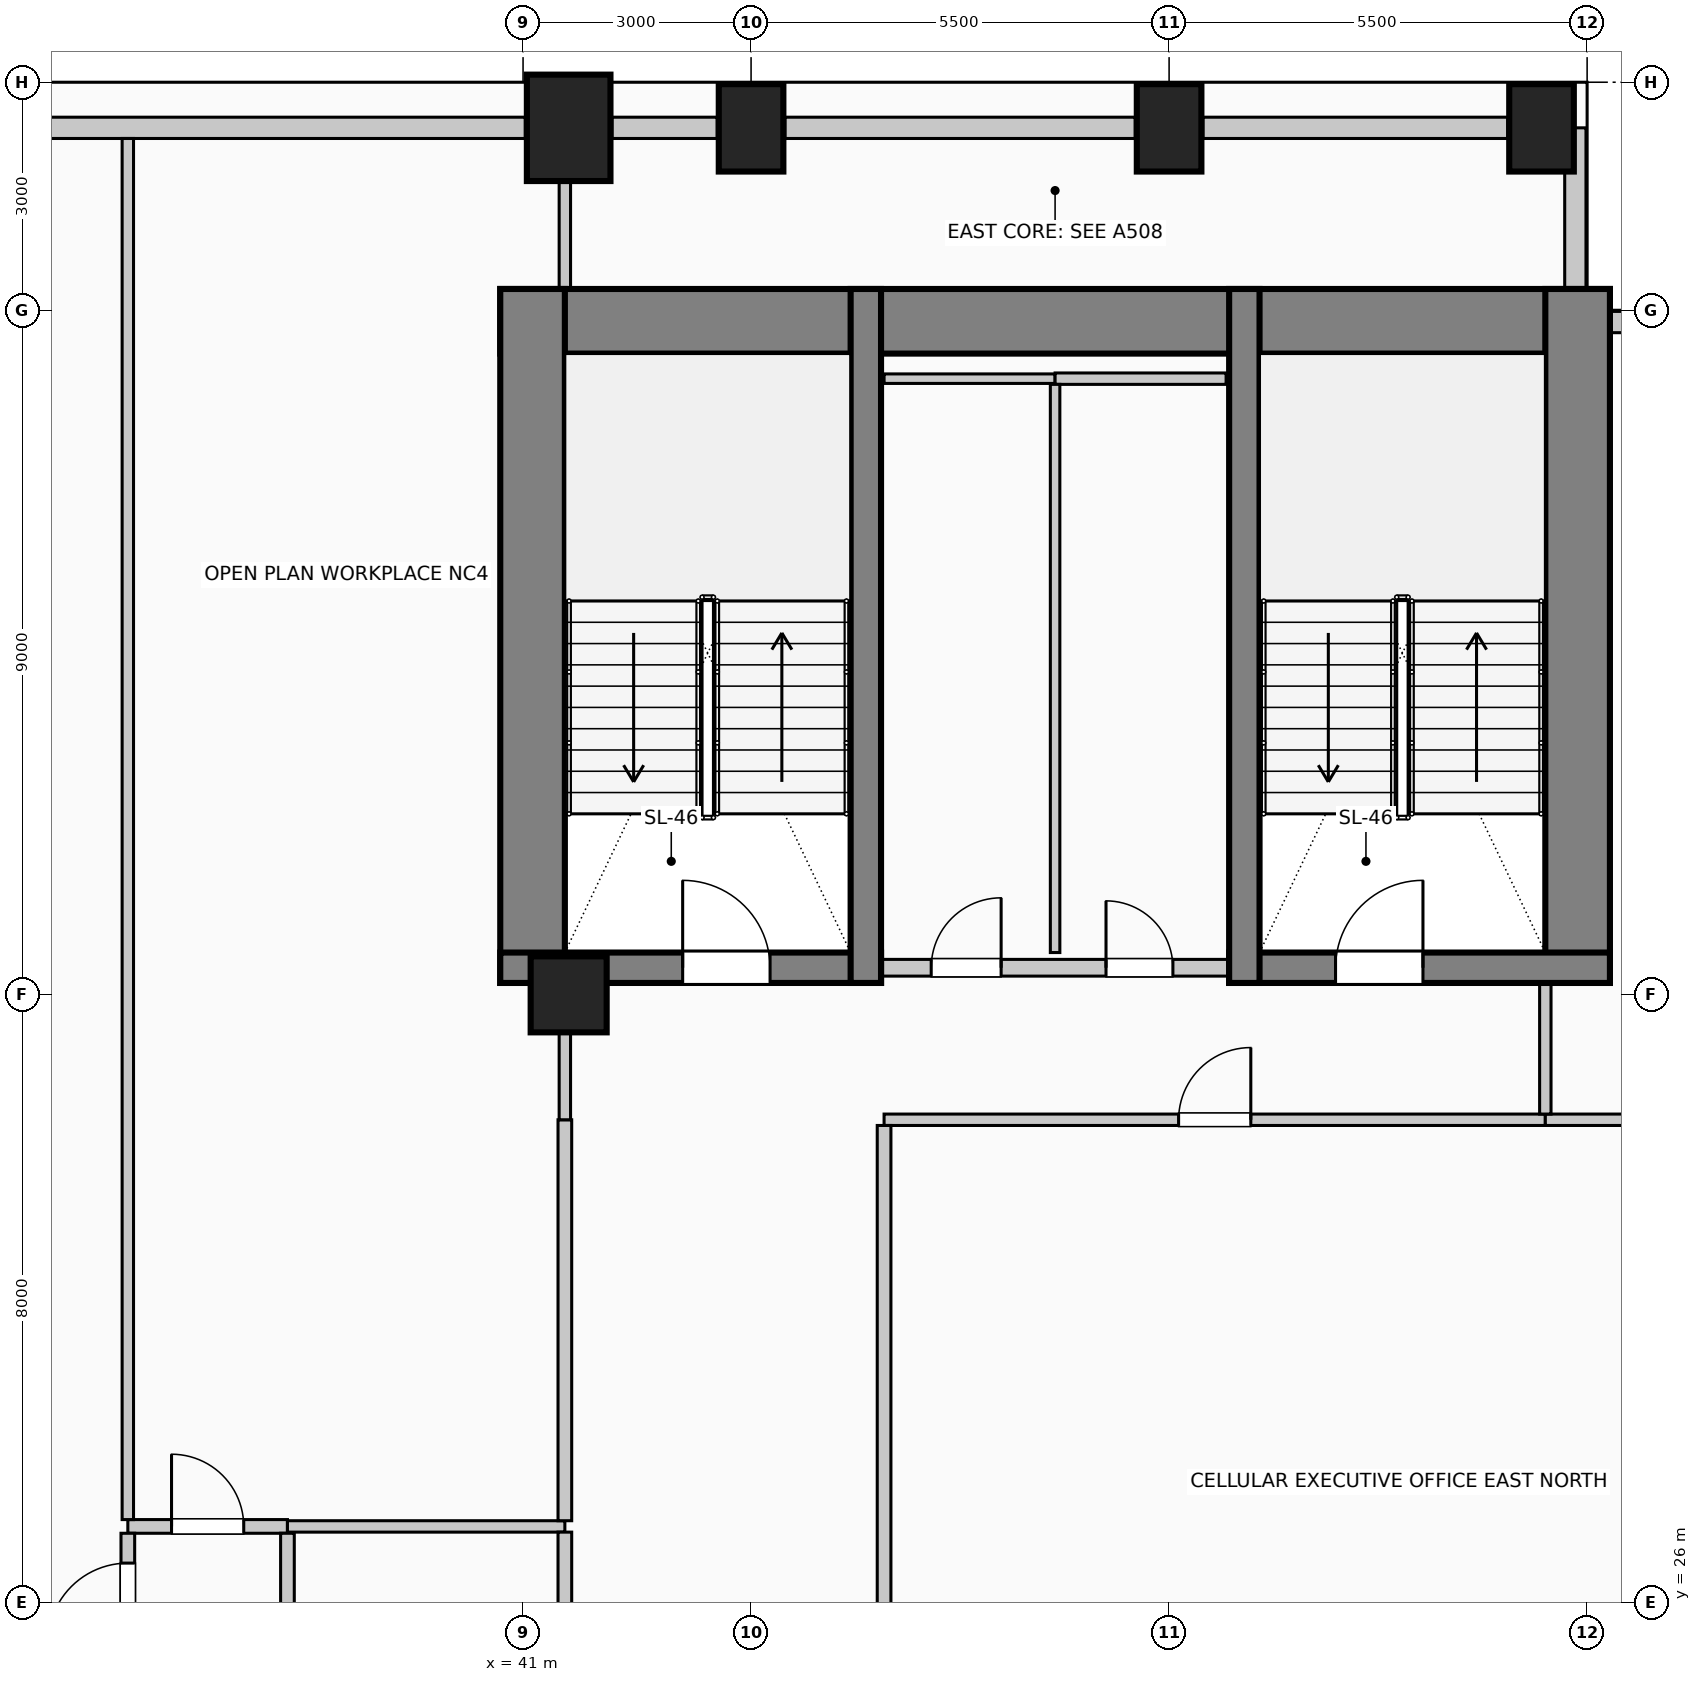
"""IFC4 building model, lengths in metres.
Left out: names, types, materials, properties, quantities, classifications, styles, units other than length and angle.
Written with IfcOpenShell. Run it as: python <this file> out.ifc"""

import sys

from ifc_helpers import new_model, si_unit, direction, frame, frame_2d, origin, origin_2d, place, context, subcontext, project, spatial, rectangle, circle, extrude, element, fill, save


model = new_model("IFC4")
c1 = context("Model", 3, precision=1e-05, world=origin(), true_north=direction((0.0, 1.0)))
c2 = subcontext(c1, "Body", "Model", "MODEL_VIEW")
j1 = project(units=[si_unit("LENGTHUNIT", "METRE"), si_unit("PLANEANGLEUNIT", "RADIAN")], contexts=[c1])
p1 = place(None, origin())
s1 = spatial("IfcSite", under=j1, at=p1, CompositionType="ELEMENT")
p2 = place(p1, origin())
s2 = spatial("IfcBuilding", under=s1, at=p2, CompositionType="ELEMENT")
p3 = place(p2, frame((0.0, 0.0, 144.6)))
s3 = spatial("IfcBuildingStorey", under=s2, at=p3, CompositionType="ELEMENT", Elevation=144.6)
p4 = place(p3, frame((40.7, 42.855, 0.0), z_axis=(0.0, 0.0, 1.0), x_axis=(1.0, 0.0, 0.0)))
e1 = element("IfcWall", 1, at=p4, inside=s3, PredefinedType="SHEAR", context=c2, shape_type="SweptSolid", body=[
    extrude(rectangle(XDim=14.6, YDim=0.85, at=frame_2d((7.3, 0.0))), origin(), (0.0, 0.0, 1.0), 4.0),
])
for number, where, z_axis, x_axis in (
    (2, (41.125, 34.15, 0.0), (0.0, 0.0, 1.0), (0.0, 1.0, 0.0)),
    (3, (54.875, 34.15, 0.0), (0.0, 0.0, 1.0), (0.0, 1.0, 0.0)),
):
    element("IfcWall", number, at=place(p3, frame(where, z_axis=z_axis, x_axis=x_axis)), inside=s3, PredefinedType="SHEAR", context=c2, shape_type="SweptSolid", body=[
        extrude(rectangle(XDim=9.13, YDim=0.85, at=frame_2d((4.565, 0.0))), origin(), (0.0, 0.0, 1.0), 4.0),
    ])
p5 = place(p3, frame((40.7, 34.35, 0.0), z_axis=(0.0, 0.0, 1.0), x_axis=(1.0, 0.0, 0.0)))
e4 = element("IfcWall", 4, at=p5, inside=s3, PredefinedType="SHEAR", context=c2, shape_type="SweptSolid", body=[
    extrude(rectangle(XDim=5.01, YDim=0.4, at=frame_2d((2.505, 0.0))), origin(), (0.0, 0.0, 1.0), 4.0),
])
p6 = place(p5, frame((2.4, 0.0, 0.0)))
e5 = element("IfcOpeningElement", 5, at=p6, cuts=e4, PredefinedType="OPENING", context=c2, shape_type="SweptSolid", body=[
    extrude(rectangle(XDim=1.15, YDim=2.2, at=frame_2d((0.575, 1.1))), frame((0.0, 0.21, 0.0), z_axis=(0.0, -1.0, 0.0), x_axis=(1.0, 0.0, 0.0)), (0.0, 0.0, 1.0), 0.42),
])
p7 = place(p3, frame((45.51, 34.15, 0.0), z_axis=(0.0, 0.0, 1.0), x_axis=(0.0, 1.0, 0.0)))
e6 = element("IfcWall", 6, at=p7, inside=s3, PredefinedType="SHEAR", context=c2, shape_type="SweptSolid", body=[
    extrude(rectangle(XDim=9.13, YDim=0.4, at=frame_2d((4.565, 0.0))), origin(), (0.0, 0.0, 1.0), 4.0),
])
p8 = place(p3, frame((50.29, 34.35, 0.0), z_axis=(0.0, 0.0, 1.0), x_axis=(1.0, 0.0, 0.0)))
e7 = element("IfcWall", 7, at=p8, inside=s3, PredefinedType="SHEAR", context=c2, shape_type="SweptSolid", body=[
    extrude(rectangle(XDim=5.01, YDim=0.4, at=frame_2d((2.505, 0.0))), origin(), (0.0, 0.0, 1.0), 4.0),
])
p9 = place(p8, frame((1.4, 0.0, 0.0)))
e8 = element("IfcOpeningElement", 8, at=p9, cuts=e7, PredefinedType="OPENING", context=c2, shape_type="SweptSolid", body=[
    extrude(rectangle(XDim=1.15, YDim=2.2, at=frame_2d((0.575, 1.1))), frame((0.0, 0.21, 0.0), z_axis=(0.0, -1.0, 0.0), x_axis=(1.0, 0.0, 0.0)), (0.0, 0.0, 1.0), 0.42),
])
p10 = place(p3, frame((50.49, 34.15, 0.0), z_axis=(0.0, 0.0, 1.0), x_axis=(0.0, 1.0, 0.0)))
e9 = element("IfcWall", 9, at=p10, inside=s3, PredefinedType="SHEAR", context=c2, shape_type="SweptSolid", body=[
    extrude(rectangle(XDim=9.13, YDim=0.4, at=frame_2d((4.565, 0.0))), origin(), (0.0, 0.0, 1.0), 4.0),
])
p11 = place(p3, frame((41.6, 45.4, 0.0), z_axis=(0.0, 0.0, 1.0), x_axis=(1.0, 0.0, 0.0)))
e10 = element("IfcColumn", 10, at=p11, inside=s3, PredefinedType="COLUMN", context=c2, shape_type="SweptSolid", body=[
    extrude(rectangle(XDim=1.1, YDim=1.4, at=origin_2d()), origin(), (0.0, 0.0, 1.0), 4.0),
])
for number, where, z_axis, x_axis in (
    (11, (44.0, 45.4, 0.0), (0.0, 0.0, 1.0), (1.0, 0.0, 0.0)),
    (12, (49.5, 45.4, 0.0), (0.0, 0.0, 1.0), (1.0, 0.0, 0.0)),
    (13, (54.4, 45.4, 0.0), (0.0, 0.0, 1.0), (1.0, 0.0, 0.0)),
):
    element("IfcColumn", number, at=place(p3, frame(where, z_axis=z_axis, x_axis=x_axis)), inside=s3, PredefinedType="COLUMN", context=c2, shape_type="SweptSolid", body=[
        extrude(rectangle(XDim=0.85, YDim=1.15, at=origin_2d()), origin(), (0.0, 0.0, 1.0), 4.0),
    ])
p12 = place(p3, frame((41.6, 34.0, 0.0), z_axis=(0.0, 0.0, 1.0), x_axis=(1.0, 0.0, 0.0)))
e14 = element("IfcColumn", 14, at=p12, inside=s3, PredefinedType="COLUMN", context=c2, shape_type="SweptSolid", body=[
    extrude(circle(Radius=0.5, at=origin_2d()), origin(), (0.0, 0.0, 1.0), 4.0),
])
p13 = place(p3, frame((34.57, 45.4, 0.0), z_axis=(0.0, 0.0, 1.0), x_axis=(1.0, 0.0, 0.0)))
e15 = element("IfcWall", 15, at=p13, inside=s3, PredefinedType="SOLIDWALL", context=c2, shape_type="SweptSolid", body=[
    extrude(rectangle(XDim=6.46, YDim=0.28, at=frame_2d((3.23, 0.0))), origin(), (0.0, 0.0, 1.0), 2.875),
])
p14 = place(p3, frame((42.17, 45.4, 0.0), z_axis=(0.0, 0.0, 1.0), x_axis=(1.0, 0.0, 0.0)))
e16 = element("IfcWall", 16, at=p14, inside=s3, PredefinedType="SOLIDWALL", context=c2, shape_type="SweptSolid", body=[
    extrude(rectangle(XDim=1.385, YDim=0.28, at=frame_2d((0.692, 0.0))), origin(), (0.0, 0.0, 1.0), 2.875),
])
p15 = place(p3, frame((44.445, 45.4, 0.0), z_axis=(0.0, 0.0, 1.0), x_axis=(1.0, 0.0, 0.0)))
e17 = element("IfcWall", 17, at=p15, inside=s3, PredefinedType="SOLIDWALL", context=c2, shape_type="SweptSolid", body=[
    extrude(rectangle(XDim=4.61, YDim=0.28, at=frame_2d((2.305, 0.0))), origin(), (0.0, 0.0, 1.0), 2.875),
])
p16 = place(p3, frame((49.945, 45.4, 0.0), z_axis=(0.0, 0.0, 1.0), x_axis=(1.0, 0.0, 0.0)))
e18 = element("IfcWall", 18, at=p16, inside=s3, PredefinedType="SOLIDWALL", context=c2, shape_type="SweptSolid", body=[
    extrude(rectangle(XDim=4.01, YDim=0.28, at=frame_2d((2.005, 0.0))), origin(), (0.0, 0.0, 1.0), 2.875),
])
p17 = place(p3, frame((54.845, 45.4, 0.0), z_axis=(0.0, 0.0, 1.0), x_axis=(0.0, -1.0, 0.0)))
e19 = element("IfcWall", 19, at=p17, inside=s3, PredefinedType="SOLIDWALL", context=c2, shape_type="SweptSolid", body=[
    extrude(rectangle(XDim=2.115, YDim=0.28, at=frame_2d((1.058, 0.0))), origin(), (0.0, 0.0, 1.0), 3.725),
])
p18 = place(p3, frame((55.305, 42.845, 0.0), z_axis=(0.0, 0.0, 1.0), x_axis=(1.0, 0.0, 0.0)))
e20 = element("IfcWall", 20, at=p18, inside=s3, PredefinedType="SOLIDWALL", context=c2, shape_type="SweptSolid", body=[
    extrude(rectangle(XDim=2.095, YDim=0.28, at=frame_2d((1.047, 0.0))), origin(), (0.0, 0.0, 1.0), 3.725),
])
p19 = place(p3, frame((45.72, 34.35, 0.0), z_axis=(0.0, 0.0, 1.0), x_axis=(1.0, 0.0, 0.0)))
e21 = element("IfcWall", 21, at=p19, inside=s3, PredefinedType="PARTITIONING", context=c2, shape_type="SweptSolid", body=[
    extrude(rectangle(XDim=4.56, YDim=0.22, at=frame_2d((2.28, 0.0))), origin(), (0.0, 0.0, 1.0), 3.725),
])
p20 = place(p19, frame((0.65, 0.0, 0.0)))
e22 = element("IfcOpeningElement", 22, at=p20, cuts=e21, PredefinedType="OPENING", context=c2, shape_type="SweptSolid", body=[
    extrude(rectangle(XDim=0.92, YDim=2.1, at=frame_2d((0.46, 1.05))), frame((0.0, 0.12, 0.0), z_axis=(0.0, -1.0, 0.0), x_axis=(1.0, 0.0, 0.0)), (0.0, 0.0, 1.0), 0.24),
])
p21 = place(p19, frame((2.95, 0.0, 0.0)))
e23 = element("IfcOpeningElement", 23, at=p21, cuts=e21, PredefinedType="OPENING", context=c2, shape_type="SweptSolid", body=[
    extrude(rectangle(XDim=0.88, YDim=2.1, at=frame_2d((0.44, 1.05))), frame((0.0, 0.12, 0.0), z_axis=(0.0, -1.0, 0.0), x_axis=(1.0, 0.0, 0.0)), (0.0, 0.0, 1.0), 0.24),
])
p22 = place(p3, frame((35.8, 27.0, 0.0), z_axis=(0.0, 0.0, 1.0), x_axis=(1.0, 0.0, 0.0)))
e24 = element("IfcWall", 24, at=p22, inside=s3, PredefinedType="PARTITIONING", context=c2, shape_type="SweptSolid", body=[
    extrude(rectangle(XDim=2.1, YDim=0.18, at=frame_2d((1.05, 0.0))), origin(), (0.0, 0.0, 1.0), 3.725),
])
p23 = place(p22, frame((0.575, 0.0, 0.0)))
e25 = element("IfcOpeningElement", 25, at=p23, cuts=e24, PredefinedType="OPENING", context=c2, shape_type="SweptSolid", body=[
    extrude(rectangle(XDim=0.95, YDim=2.15, at=frame_2d((0.475, 1.075))), frame((0.0, 0.1, 0.0), z_axis=(0.0, -1.0, 0.0), x_axis=(1.0, 0.0, 0.0)), (0.0, 0.0, 1.0), 0.2),
])
p24 = place(p3, frame((37.9, 27.0, 0.0), z_axis=(0.0, 0.0, 1.0), x_axis=(1.0, 0.0, 0.0)))
e26 = element("IfcWall", 26, at=p24, inside=s3, PredefinedType="PARTITIONING", context=c2, shape_type="SweptSolid", body=[
    extrude(rectangle(XDim=3.65, YDim=0.15, at=frame_2d((1.825, 0.0))), origin(), (0.0, 0.0, 1.0), 3.725),
])
p25 = place(p3, frame((45.75, 32.35, 0.0), z_axis=(0.0, 0.0, 1.0), x_axis=(1.0, 0.0, 0.0)))
e27 = element("IfcWall", 27, at=p25, inside=s3, PredefinedType="PARTITIONING", context=c2, shape_type="SweptSolid", body=[
    extrude(rectangle(XDim=8.7, YDim=0.15, at=frame_2d((4.35, 0.0))), origin(), (0.0, 0.0, 1.0), 3.725),
])
p26 = place(p25, frame((3.875, 0.0, 0.0)))
e28 = element("IfcOpeningElement", 28, at=p26, cuts=e27, PredefinedType="OPENING", context=c2, shape_type="SweptSolid", body=[
    extrude(rectangle(XDim=0.95, YDim=2.15, at=frame_2d((0.475, 1.075))), frame((0.0, 0.085, 0.0), z_axis=(0.0, -1.0, 0.0), x_axis=(1.0, 0.0, 0.0)), (0.0, 0.0, 1.0), 0.17),
])
p27 = place(p3, frame((54.45, 32.35, 0.0), z_axis=(0.0, 0.0, 1.0), x_axis=(1.0, 0.0, 0.0)))
e29 = element("IfcWall", 29, at=p27, inside=s3, PredefinedType="PARTITIONING", context=c2, shape_type="SweptSolid", body=[
    extrude(rectangle(XDim=2.81, YDim=0.15, at=frame_2d((1.405, 0.0))), origin(), (0.0, 0.0, 1.0), 3.725),
])
p28 = place(p3, frame((45.75, 42.1, 0.0), z_axis=(0.0, 0.0, 1.0), x_axis=(1.0, 0.0, 0.0)))
e30 = element("IfcWall", 30, at=p28, inside=s3, PredefinedType="PARTITIONING", context=c2, shape_type="SweptSolid", body=[
    extrude(rectangle(XDim=2.25, YDim=0.125, at=frame_2d((1.125, 0.0))), origin(), (0.0, 0.0, 1.0), 3.725),
])
p29 = place(p3, frame((48.0, 42.1, 0.0), z_axis=(0.0, 0.0, 1.0), x_axis=(1.0, 0.0, 0.0)))
e31 = element("IfcWall", 31, at=p29, inside=s3, PredefinedType="PARTITIONING", context=c2, shape_type="SweptSolid", body=[
    extrude(rectangle(XDim=2.25, YDim=0.15, at=frame_2d((1.125, 0.0))), origin(), (0.0, 0.0, 1.0), 3.725),
])
p30 = place(p3, frame((35.8, 25.075, 0.0), z_axis=(0.0, 0.0, 1.0), x_axis=(0.0, 1.0, 0.0)))
e32 = element("IfcWall", 32, at=p30, inside=s3, PredefinedType="PARTITIONING", context=c2, shape_type="SweptSolid", body=[
    extrude(rectangle(XDim=1.835, YDim=0.18, at=frame_2d((0.917, 0.0))), origin(), (0.0, 0.0, 1.0), 3.725),
])
p31 = place(p30, frame((0.393, 0.0, 0.0)))
e33 = element("IfcOpeningElement", 33, at=p31, cuts=e32, PredefinedType="OPENING", context=c2, shape_type="SweptSolid", body=[
    extrude(rectangle(XDim=1.05, YDim=2.15, at=frame_2d((0.525, 1.075))), frame((0.0, 0.1, 0.0), z_axis=(0.0, -1.0, 0.0), x_axis=(1.0, 0.0, 0.0)), (0.0, 0.0, 1.0), 0.2),
])
p32 = place(p3, frame((35.8, 27.09, 0.0), z_axis=(0.0, 0.0, 1.0), x_axis=(0.0, 1.0, 0.0)))
e34 = element("IfcWall", 34, at=p32, inside=s3, PredefinedType="PARTITIONING", context=c2, shape_type="SweptSolid", body=[
    extrude(rectangle(XDim=18.17, YDim=0.15, at=frame_2d((9.085, 0.0))), origin(), (0.0, 0.0, 1.0), 3.725),
])
p33 = place(p3, frame((37.9, 15.74, 0.0), z_axis=(0.0, 0.0, 1.0), x_axis=(0.0, 1.0, 0.0)))
e35 = element("IfcWall", 35, at=p33, inside=s3, PredefinedType="PARTITIONING", context=c2, shape_type="SweptSolid", body=[
    extrude(rectangle(XDim=11.17, YDim=0.18, at=frame_2d((5.585, 0.0))), origin(), (0.0, 0.0, 1.0), 3.725),
])
p34 = place(p3, frame((41.55, 18.5, 0.0), z_axis=(0.0, 0.0, 1.0), x_axis=(0.0, 1.0, 0.0)))
e36 = element("IfcWall", 36, at=p34, inside=s3, PredefinedType="PARTITIONING", context=c2, shape_type="SweptSolid", body=[
    extrude(rectangle(XDim=8.425, YDim=0.18, at=frame_2d((4.212, 0.0))), origin(), (0.0, 0.0, 1.0), 3.07),
])
p35 = place(p3, frame((41.55, 27.075, 0.0), z_axis=(0.0, 0.0, 1.0), x_axis=(0.0, 1.0, 0.0)))
e37 = element("IfcWall", 37, at=p35, inside=s3, PredefinedType="PARTITIONING", context=c2, shape_type="SweptSolid", body=[
    extrude(rectangle(XDim=5.275, YDim=0.18, at=frame_2d((2.638, 0.0))), origin(), (0.0, 0.0, 1.0), 3.07),
])
p36 = place(p3, frame((41.55, 32.35, 0.0), z_axis=(0.0, 0.0, 1.0), x_axis=(0.0, 1.0, 0.0)))
e38 = element("IfcWall", 38, at=p36, inside=s3, PredefinedType="PARTITIONING", context=c2, shape_type="SweptSolid", body=[
    extrude(rectangle(XDim=1.15, YDim=0.15, at=frame_2d((0.575, 0.0))), origin(), (0.0, 0.0, 1.0), 3.07),
])
p37 = place(p3, frame((41.55, 43.28, 0.0), z_axis=(0.0, 0.0, 1.0), x_axis=(0.0, 1.0, 0.0)))
e39 = element("IfcWall", 39, at=p37, inside=s3, PredefinedType="PARTITIONING", context=c2, shape_type="SweptSolid", body=[
    extrude(rectangle(XDim=1.42, YDim=0.15, at=frame_2d((0.71, 0.0))), origin(), (0.0, 0.0, 1.0), 3.725),
])
p38 = place(p3, frame((45.75, 22.925, 0.0), z_axis=(0.0, 0.0, 1.0), x_axis=(0.0, 1.0, 0.0)))
e40 = element("IfcWall", 40, at=p38, inside=s3, PredefinedType="PARTITIONING", context=c2, shape_type="SweptSolid", body=[
    extrude(rectangle(XDim=9.35, YDim=0.18, at=frame_2d((4.675, 0.0))), origin(), (0.0, 0.0, 1.0), 3.725),
])
p39 = place(p3, frame((48.0, 34.55, 0.0), z_axis=(0.0, 0.0, 1.0), x_axis=(0.0, 1.0, 0.0)))
e41 = element("IfcWall", 41, at=p39, inside=s3, PredefinedType="PARTITIONING", context=c2, shape_type="SweptSolid", body=[
    extrude(rectangle(XDim=7.475, YDim=0.125, at=frame_2d((3.737, 0.0))), origin(), (0.0, 0.0, 1.0), 3.725),
])
p40 = place(p3, frame((54.45, 32.425, 0.0), z_axis=(0.0, 0.0, 1.0), x_axis=(0.0, 1.0, 0.0)))
e42 = element("IfcWall", 42, at=p40, inside=s3, PredefinedType="PARTITIONING", context=c2, shape_type="SweptSolid", body=[
    extrude(rectangle(XDim=1.725, YDim=0.15, at=frame_2d((0.862, 0.0))), origin(), (0.0, 0.0, 1.0), 3.725),
])
p41 = place(p6, origin())
e43 = element("IfcDoor", 43, at=p41, inside=s3, OperationType="SINGLE_SWING_LEFT", PredefinedType="DOOR", context=c2, shape_type="SweptSolid", body=[
    extrude(rectangle(XDim=1.15, YDim=2.2, at=frame_2d((0.575, 1.1))), frame((0.0, 0.025, 0.0), z_axis=(0.0, -1.0, 0.0), x_axis=(1.0, 0.0, 0.0)), (0.0, 0.0, 1.0), 0.05),
])
fill(e5, e43)
p42 = place(p20, origin())
e44 = element("IfcDoor", 44, at=p42, inside=s3, OperationType="SINGLE_SWING_RIGHT", PredefinedType="DOOR", context=c2, shape_type="SweptSolid", body=[
    extrude(rectangle(XDim=0.92, YDim=2.1, at=frame_2d((0.46, 1.05))), frame((0.0, 0.025, 0.0), z_axis=(0.0, -1.0, 0.0), x_axis=(1.0, 0.0, 0.0)), (0.0, 0.0, 1.0), 0.05),
])
fill(e22, e44)
p43 = place(p21, origin())
e45 = element("IfcDoor", 45, at=p43, inside=s3, OperationType="SINGLE_SWING_LEFT", PredefinedType="DOOR", context=c2, shape_type="SweptSolid", body=[
    extrude(rectangle(XDim=0.88, YDim=2.1, at=frame_2d((0.44, 1.05))), frame((0.0, 0.025, 0.0), z_axis=(0.0, -1.0, 0.0), x_axis=(1.0, 0.0, 0.0)), (0.0, 0.0, 1.0), 0.05),
])
fill(e23, e45)
p44 = place(p9, origin())
e46 = element("IfcDoor", 46, at=p44, inside=s3, OperationType="SINGLE_SWING_RIGHT", PredefinedType="DOOR", context=c2, shape_type="SweptSolid", body=[
    extrude(rectangle(XDim=1.15, YDim=2.2, at=frame_2d((0.575, 1.1))), frame((0.0, 0.025, 0.0), z_axis=(0.0, -1.0, 0.0), x_axis=(1.0, 0.0, 0.0)), (0.0, 0.0, 1.0), 0.05),
])
fill(e8, e46)
p45 = place(p23, origin())
e47 = element("IfcDoor", 47, at=p45, inside=s3, OperationType="SINGLE_SWING_LEFT", PredefinedType="DOOR", context=c2, shape_type="SweptSolid", body=[
    extrude(rectangle(XDim=0.95, YDim=2.15, at=frame_2d((0.475, 1.075))), frame((0.0, 0.025, 0.0), z_axis=(0.0, -1.0, 0.0), x_axis=(1.0, 0.0, 0.0)), (0.0, 0.0, 1.0), 0.05),
])
fill(e25, e47)
p46 = place(p26, origin())
e48 = element("IfcDoor", 48, at=p46, inside=s3, OperationType="SINGLE_SWING_RIGHT", PredefinedType="DOOR", context=c2, shape_type="SweptSolid", body=[
    extrude(rectangle(XDim=0.95, YDim=2.15, at=frame_2d((0.475, 1.075))), frame((0.0, 0.025, 0.0), z_axis=(0.0, -1.0, 0.0), x_axis=(1.0, 0.0, 0.0)), (0.0, 0.0, 1.0), 0.05),
])
fill(e28, e48)
p47 = place(p31, origin())
e49 = element("IfcDoor", 49, at=p47, inside=s3, OperationType="SINGLE_SWING_LEFT", PredefinedType="DOOR", context=c2, shape_type="SweptSolid", body=[
    extrude(rectangle(XDim=1.05, YDim=2.15, at=frame_2d((0.525, 1.075))), frame((0.0, 0.025, 0.0), z_axis=(0.0, -1.0, 0.0), x_axis=(1.0, 0.0, 0.0)), (0.0, 0.0, 1.0), 0.05),
])
fill(e33, e49)
save(model, sys.argv[1])
